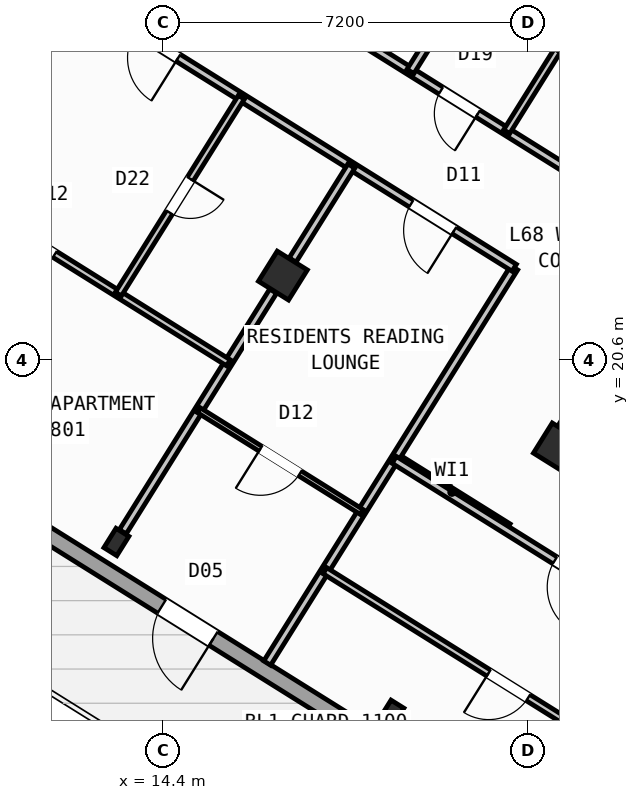
"""IFC4 building model, lengths in metres.
Left out: names, types, materials, properties, quantities, classifications, styles, units other than length and angle.
Written with IfcOpenShell. Run it as: python <this file> out.ifc"""

import sys

from ifc_helpers import new_model, si_unit, direction, frame, frame_2d, origin, origin_2d, place, context, subcontext, project, spatial, rectangle, hollow_rectangle, i_section, extrude, source, transform, mapped, element, fill, save


model = new_model("IFC4")
c1 = context("Model", 3, precision=1e-05, world=origin(), true_north=direction((0.0, 1.0)))
c2 = subcontext(c1, "Body", "Model", "MODEL_VIEW")
j1 = project(units=[si_unit("LENGTHUNIT", "METRE"), si_unit("PLANEANGLEUNIT", "RADIAN")], contexts=[c1])
p1 = place(None, origin())
s1 = spatial("IfcSite", under=j1, at=p1, CompositionType="ELEMENT")
p2 = place(p1, origin())
s2 = spatial("IfcBuilding", under=s1, at=p2, CompositionType="ELEMENT")
p3 = place(p2, frame((0.0, 0.0, 270.0)))
s3 = spatial("IfcBuildingStorey", under=s2, at=p3, CompositionType="ELEMENT", Elevation=270.0)
p4 = place(p3, frame((33.324, 12.503, 0.0), z_axis=(0.0, 0.0, 1.0), x_axis=(-0.848043529849, 0.529926571782, 0.0)))
e1 = element("IfcWall", 1, at=p4, inside=s3, PredefinedType="SHEAR", context=c2, shape_type="SweptSolid", body=[
    extrude(rectangle(XDim=13.04, YDim=0.45, at=frame_2d((6.52, 0.0))), origin(), (0.0, 0.0, 1.0), 3.35),
])
m1 = source(origin(), c2, "Body", "SweptSolid", [
    extrude(hollow_rectangle(XDim=0.7, YDim=0.7, WallThickness=0.028, at=origin_2d()), origin(), (0.0, 0.0, 1.0), 3.6),
])
p5 = place(p3, frame((22.191, 18.87, 0.0), z_axis=(0.0, 0.0, 1.0), x_axis=(-0.848048096156, 0.529919264233, 0.0)))
e2 = element("IfcColumn", 2, at=p5, inside=s3, PredefinedType="COLUMN", context=c2, shape_type="MappedRepresentation", body=[
    mapped(m1, transform((0.0, 0.0, 0.0), scale=1.0)),
])
m2 = source(origin(), c2, "Body", "SweptSolid", [
    extrude(i_section(OverallWidth=0.3, OverallDepth=0.45, WebThickness=0.014, FlangeThickness=0.026, at=origin_2d()), origin(), (0.0, 0.0, 1.0), 3.6),
])
p6 = place(p3, frame((18.906, 13.612, 0.0), z_axis=(0.0, 0.0, 1.0), x_axis=(-0.848048096156, 0.529919264233, 0.0)))
e3 = element("IfcColumn", 3, at=p6, inside=s3, PredefinedType="COLUMN", context=c2, shape_type="MappedRepresentation", body=[
    mapped(m2, transform((0.0, 0.0, 0.0), scale=1.0)),
])
p7 = place(p3, frame((16.764, 22.261, 0.0), z_axis=(0.0, 0.0, 1.0), x_axis=(-0.848048096156, 0.529919264233, 0.0)))
e4 = element("IfcColumn", 4, at=p7, inside=s3, PredefinedType="COLUMN", context=c2, shape_type="MappedRepresentation", body=[
    mapped(m1, transform((0.0, 0.0, 0.0), scale=1.0)),
])
p8 = place(p3, frame((13.478, 17.003, 0.0), z_axis=(0.0, 0.0, 1.0), x_axis=(-0.848048096156, 0.529919264233, 0.0)))
e5 = element("IfcColumn", 5, at=p8, inside=s3, PredefinedType="COLUMN", context=c2, shape_type="MappedRepresentation", body=[
    mapped(m2, transform((0.0, 0.0, 0.0), scale=1.0)),
])
p9 = place(p3, frame((29.268, 6.429, 0.0), z_axis=(0.0, 0.0, 1.0), x_axis=(-0.848049971435, 0.529916263149, 0.0)))
e6 = element("IfcWall", 6, at=p9, inside=s3, PredefinedType="STANDARD", context=c2, shape_type="SweptSolid", body=[
    extrude(rectangle(XDim=31.588, YDim=0.32, at=frame_2d((15.794, 0.0))), origin(), (0.0, 0.0, 1.0), 3.35),
])
p10 = place(p9, frame((16.362, 0.0, 0.0)))
e7 = element("IfcOpeningElement", 7, at=p10, cuts=e6, PredefinedType="OPENING", context=c2, shape_type="SweptSolid", body=[
    extrude(rectangle(XDim=1.2, YDim=2.15, at=frame_2d((0.6, 1.075))), frame((0.0, 0.17, 0.0), z_axis=(0.0, -1.0, 0.0), x_axis=(1.0, 0.0, 0.0)), (0.0, 0.0, 1.0), 0.34),
])
p11 = place(p9, frame((3.859, 0.0, 0.9)))
e8 = element("IfcOpeningElement", 8, at=p11, cuts=e6, PredefinedType="OPENING", context=c2, shape_type="SweptSolid", body=[
    extrude(rectangle(XDim=1.65, YDim=1.45, at=frame_2d((0.825, 0.725))), frame((0.0, 0.17, 0.0), z_axis=(0.0, -1.0, 0.0), x_axis=(1.0, 0.0, 0.0)), (0.0, 0.0, 1.0), 0.34),
])
p12 = place(p9, frame((10.519, 0.0, 0.9)))
e9 = element("IfcOpeningElement", 9, at=p12, cuts=e6, PredefinedType="OPENING", context=c2, shape_type="SweptSolid", body=[
    extrude(rectangle(XDim=1.65, YDim=1.45, at=frame_2d((0.825, 0.725))), frame((0.0, 0.17, 0.0), z_axis=(0.0, -1.0, 0.0), x_axis=(1.0, 0.0, 0.0)), (0.0, 0.0, 1.0), 0.34),
])
p13 = place(p9, frame((21.219, 0.0, 0.95)))
e10 = element("IfcOpeningElement", 10, at=p13, cuts=e6, PredefinedType="OPENING", context=c2, shape_type="SweptSolid", body=[
    extrude(rectangle(XDim=1.95, YDim=1.35, at=frame_2d((0.975, 0.675))), frame((0.0, 0.17, 0.0), z_axis=(0.0, -1.0, 0.0), x_axis=(1.0, 0.0, 0.0)), (0.0, 0.0, 1.0), 0.34),
])
p14 = place(p9, frame((26.406, 0.0, 1.0)))
e11 = element("IfcOpeningElement", 11, at=p14, cuts=e6, PredefinedType="OPENING", context=c2, shape_type="SweptSolid", body=[
    extrude(rectangle(XDim=0.9, YDim=1.25, at=frame_2d((0.45, 0.625))), frame((0.0, 0.17, 0.0), z_axis=(0.0, -1.0, 0.0), x_axis=(1.0, 0.0, 0.0)), (0.0, 0.0, 1.0), 0.34),
])
p15 = place(p9, frame((29.143, 0.0, 0.9)))
e12 = element("IfcOpeningElement", 12, at=p15, cuts=e6, PredefinedType="OPENING", context=c2, shape_type="SweptSolid", body=[
    extrude(rectangle(XDim=1.65, YDim=1.45, at=frame_2d((0.825, 0.725))), frame((0.0, 0.17, 0.0), z_axis=(0.0, -1.0, 0.0), x_axis=(1.0, 0.0, 0.0)), (0.0, 0.0, 1.0), 0.34),
])
p16 = place(p3, frame((2.415, 23.452, 0.0), z_axis=(0.0, 0.0, 1.0), x_axis=(0.52991049553, 0.848053575387, 0.0)))
e13 = element("IfcWall", 13, at=p16, inside=s3, PredefinedType="STANDARD", context=c2, shape_type="SweptSolid", body=[
    extrude(rectangle(XDim=21.587, YDim=0.32, at=frame_2d((10.794, 0.0))), origin(), (0.0, 0.0, 1.0), 2.875),
])
p17 = place(p16, frame((2.606, 0.0, 0.9)))
e14 = element("IfcOpeningElement", 14, at=p17, cuts=e13, PredefinedType="OPENING", context=c2, shape_type="SweptSolid", body=[
    extrude(rectangle(XDim=1.65, YDim=1.45, at=frame_2d((0.825, 0.725))), frame((0.0, 0.17, 0.0), z_axis=(0.0, -1.0, 0.0), x_axis=(1.0, 0.0, 0.0)), (0.0, 0.0, 1.0), 0.34),
])
p18 = place(p16, frame((7.504, 0.0, 1.0)))
e15 = element("IfcOpeningElement", 15, at=p18, cuts=e13, PredefinedType="OPENING", context=c2, shape_type="SweptSolid", body=[
    extrude(rectangle(XDim=0.9, YDim=1.25, at=frame_2d((0.45, 0.625))), frame((0.0, 0.17, 0.0), z_axis=(0.0, -1.0, 0.0), x_axis=(1.0, 0.0, 0.0)), (0.0, 0.0, 1.0), 0.34),
])
p19 = place(p16, frame((12.084, 0.0, 1.0)))
e16 = element("IfcOpeningElement", 16, at=p19, cuts=e13, PredefinedType="OPENING", context=c2, shape_type="SweptSolid", body=[
    extrude(rectangle(XDim=0.9, YDim=1.25, at=frame_2d((0.45, 0.625))), frame((0.0, 0.17, 0.0), z_axis=(0.0, -1.0, 0.0), x_axis=(1.0, 0.0, 0.0)), (0.0, 0.0, 1.0), 0.34),
])
p20 = place(p16, frame((15.619, 0.0, 1.0)))
e17 = element("IfcOpeningElement", 17, at=p20, cuts=e13, PredefinedType="OPENING", context=c2, shape_type="SweptSolid", body=[
    extrude(rectangle(XDim=0.9, YDim=1.25, at=frame_2d((0.45, 0.625))), frame((0.0, 0.17, 0.0), z_axis=(0.0, -1.0, 0.0), x_axis=(1.0, 0.0, 0.0)), (0.0, 0.0, 1.0), 0.34),
])
p21 = place(p16, frame((18.569, 0.0, 1.0)))
e18 = element("IfcOpeningElement", 18, at=p21, cuts=e13, PredefinedType="OPENING", context=c2, shape_type="SweptSolid", body=[
    extrude(rectangle(XDim=0.9, YDim=1.25, at=frame_2d((0.45, 0.625))), frame((0.0, 0.17, 0.0), z_axis=(0.0, -1.0, 0.0), x_axis=(1.0, 0.0, 0.0)), (0.0, 0.0, 1.0), 0.34),
])
p22 = place(p3, frame((14.138, 41.825, 0.0), z_axis=(0.0, 0.0, 1.0), x_axis=(0.848046498049, -0.529921821731, 0.0)))
e19 = element("IfcWall", 19, at=p22, inside=s3, PredefinedType="STANDARD", context=c2, shape_type="SweptSolid", body=[
    extrude(rectangle(XDim=31.588, YDim=0.32, at=frame_2d((15.794, 0.0))), origin(), (0.0, 0.0, 1.0), 3.35),
])
p23 = place(p22, frame((3.46, 0.0, 0.0)))
e20 = element("IfcOpeningElement", 20, at=p23, cuts=e19, PredefinedType="OPENING", context=c2, shape_type="SweptSolid", body=[
    extrude(rectangle(XDim=1.05, YDim=2.15, at=frame_2d((0.525, 1.075))), frame((0.0, 0.17, 0.0), z_axis=(0.0, -1.0, 0.0), x_axis=(1.0, 0.0, 0.0)), (0.0, 0.0, 1.0), 0.34),
])
p24 = place(p22, frame((0.831, 0.0, 1.0)))
e21 = element("IfcOpeningElement", 21, at=p24, cuts=e19, PredefinedType="OPENING", context=c2, shape_type="SweptSolid", body=[
    extrude(rectangle(XDim=0.9, YDim=1.25, at=frame_2d((0.45, 0.625))), frame((0.0, 0.17, 0.0), z_axis=(0.0, -1.0, 0.0), x_axis=(1.0, 0.0, 0.0)), (0.0, 0.0, 1.0), 0.34),
])
p25 = place(p22, frame((8.719, 0.0, 0.9)))
e22 = element("IfcOpeningElement", 22, at=p25, cuts=e19, PredefinedType="OPENING", context=c2, shape_type="SweptSolid", body=[
    extrude(rectangle(XDim=1.35, YDim=1.45, at=frame_2d((0.675, 0.725))), frame((0.0, 0.17, 0.0), z_axis=(0.0, -1.0, 0.0), x_axis=(1.0, 0.0, 0.0)), (0.0, 0.0, 1.0), 0.34),
])
p26 = place(p22, frame((13.599, 0.0, 0.95)))
e23 = element("IfcOpeningElement", 23, at=p26, cuts=e19, PredefinedType="OPENING", context=c2, shape_type="SweptSolid", body=[
    extrude(rectangle(XDim=1.95, YDim=1.35, at=frame_2d((0.975, 0.675))), frame((0.0, 0.17, 0.0), z_axis=(0.0, -1.0, 0.0), x_axis=(1.0, 0.0, 0.0)), (0.0, 0.0, 1.0), 0.34),
])
p27 = place(p22, frame((17.154, 0.0, 1.0)))
e24 = element("IfcOpeningElement", 24, at=p27, cuts=e19, PredefinedType="OPENING", context=c2, shape_type="SweptSolid", body=[
    extrude(rectangle(XDim=0.9, YDim=1.25, at=frame_2d((0.45, 0.625))), frame((0.0, 0.17, 0.0), z_axis=(0.0, -1.0, 0.0), x_axis=(1.0, 0.0, 0.0)), (0.0, 0.0, 1.0), 0.34),
])
p28 = place(p22, frame((21.719, 0.0, 0.9)))
e25 = element("IfcOpeningElement", 25, at=p28, cuts=e19, PredefinedType="OPENING", context=c2, shape_type="SweptSolid", body=[
    extrude(rectangle(XDim=1.65, YDim=1.45, at=frame_2d((0.825, 0.725))), frame((0.0, 0.17, 0.0), z_axis=(0.0, -1.0, 0.0), x_axis=(1.0, 0.0, 0.0)), (0.0, 0.0, 1.0), 0.34),
])
p29 = place(p22, frame((27.419, 0.0, 0.9)))
e26 = element("IfcOpeningElement", 26, at=p29, cuts=e19, PredefinedType="OPENING", context=c2, shape_type="SweptSolid", body=[
    extrude(rectangle(XDim=1.65, YDim=1.45, at=frame_2d((0.825, 0.725))), frame((0.0, 0.17, 0.0), z_axis=(0.0, -1.0, 0.0), x_axis=(1.0, 0.0, 0.0)), (0.0, 0.0, 1.0), 0.34),
])
p30 = place(p3, frame((21.206, 17.292, 0.0), z_axis=(0.0, 0.0, 1.0), x_axis=(-0.848050851465, 0.529914854792, 0.0)))
e27 = element("IfcWall", 27, at=p30, inside=s3, PredefinedType="PARTITIONING", context=c2, shape_type="SweptSolid", body=[
    extrude(rectangle(XDim=2.61, YDim=0.16, at=frame_2d((1.305, 0.0))), origin(), (0.0, 0.0, 1.0), 3.34),
])
p31 = place(p3, frame((21.329, 22.416, 0.0), z_axis=(0.0, 0.0, 1.0), x_axis=(-0.529920220799, -0.848047498427, 0.0)))
e28 = element("IfcWall", 28, at=p31, inside=s3, PredefinedType="PARTITIONING", context=c2, shape_type="SweptSolid", body=[
    extrude(rectangle(XDim=9.2, YDim=0.16, at=frame_2d((4.6, 0.0))), origin(), (0.0, 0.0, 1.0), 3.34),
])
p32 = place(p3, frame((22.495, 24.281, 0.0), z_axis=(0.0, 0.0, 1.0), x_axis=(-0.848052408131, 0.529912363569, 0.0)))
e29 = element("IfcWall", 29, at=p32, inside=s3, PredefinedType="PARTITIONING", context=c2, shape_type="SweptSolid", body=[
    extrude(rectangle(XDim=16.73, YDim=0.16, at=frame_2d((8.365, 0.0))), origin(), (0.0, 0.0, 1.0), 3.34),
])
p33 = place(p32, frame((2.22, 0.0, 0.0)))
e30 = element("IfcOpeningElement", 30, at=p33, cuts=e29, PredefinedType="OPENING", context=c2, shape_type="SweptSolid", body=[
    extrude(rectangle(XDim=0.86, YDim=2.05, at=frame_2d((0.43, 1.025))), frame((0.0, 0.09, 0.0), z_axis=(0.0, -1.0, 0.0), x_axis=(1.0, 0.0, 0.0)), (0.0, 0.0, 1.0), 0.18),
])
p34 = place(p32, frame((6.49, 0.0, 0.0)))
e31 = element("IfcOpeningElement", 31, at=p34, cuts=e29, PredefinedType="OPENING", context=c2, shape_type="SweptSolid", body=[
    extrude(rectangle(XDim=1.0, YDim=2.1, at=frame_2d((0.5, 1.05))), frame((0.0, 0.09, 0.0), z_axis=(0.0, -1.0, 0.0), x_axis=(1.0, 0.0, 0.0)), (0.0, 0.0, 1.0), 0.18),
])
p35 = place(p32, frame((14.76, 0.0, 0.0)))
e32 = element("IfcOpeningElement", 32, at=p35, cuts=e29, PredefinedType="OPENING", context=c2, shape_type="SweptSolid", body=[
    extrude(rectangle(XDim=1.0, YDim=2.1, at=frame_2d((0.5, 1.05))), frame((0.0, 0.09, 0.0), z_axis=(0.0, -1.0, 0.0), x_axis=(1.0, 0.0, 0.0)), (0.0, 0.0, 1.0), 0.18),
])
p36 = place(p3, frame((21.329, 22.416, 0.0), z_axis=(0.0, 0.0, 1.0), x_axis=(-0.848052408131, 0.529912363569, 0.0)))
e33 = element("IfcWall", 33, at=p36, inside=s3, PredefinedType="PARTITIONING", context=c2, shape_type="SweptSolid", body=[
    extrude(rectangle(XDim=16.73, YDim=0.16, at=frame_2d((8.365, 0.0))), origin(), (0.0, 0.0, 1.0), 3.34),
])
p37 = place(p36, frame((1.395, 0.0, 0.0)))
e34 = element("IfcOpeningElement", 34, at=p37, cuts=e33, PredefinedType="OPENING", context=c2, shape_type="SweptSolid", body=[
    extrude(rectangle(XDim=1.0, YDim=2.1, at=frame_2d((0.5, 1.05))), frame((0.0, 0.09, 0.0), z_axis=(0.0, -1.0, 0.0), x_axis=(1.0, 0.0, 0.0)), (0.0, 0.0, 1.0), 0.18),
])
p38 = place(p36, frame((7.82, 0.0, 0.0)))
e35 = element("IfcOpeningElement", 35, at=p38, cuts=e33, PredefinedType="OPENING", context=c2, shape_type="SweptSolid", body=[
    extrude(rectangle(XDim=1.0, YDim=2.1, at=frame_2d((0.5, 1.05))), frame((0.0, 0.09, 0.0), z_axis=(0.0, -1.0, 0.0), x_axis=(1.0, 0.0, 0.0)), (0.0, 0.0, 1.0), 0.18),
])
p39 = place(p36, frame((11.14, 0.0, 0.0)))
e36 = element("IfcOpeningElement", 36, at=p39, cuts=e33, PredefinedType="OPENING", context=c2, shape_type="SweptSolid", body=[
    extrude(rectangle(XDim=1.0, YDim=2.1, at=frame_2d((0.5, 1.05))), frame((0.0, 0.09, 0.0), z_axis=(0.0, -1.0, 0.0), x_axis=(1.0, 0.0, 0.0)), (0.0, 0.0, 1.0), 0.18),
])
p40 = place(p3, frame((18.115, 24.424, 0.0), z_axis=(0.0, 0.0, 1.0), x_axis=(-0.529998940003, -0.847998304005, 0.0)))
e37 = element("IfcWall", 37, at=p40, inside=s3, PredefinedType="PARTITIONING", context=c2, shape_type="SweptSolid", body=[
    extrude(rectangle(XDim=2.188, YDim=0.16, at=frame_2d((1.094, 0.0))), origin(), (0.0, 0.0, 1.0), 2.875),
])
p41 = place(p3, frame((16.572, 21.954, 0.0), z_axis=(0.0, 0.0, 1.0), x_axis=(-0.529904903214, -0.848057069748, 0.0)))
e38 = element("IfcWall", 38, at=p41, inside=s3, PredefinedType="PARTITIONING", context=c2, shape_type="SweptSolid", body=[
    extrude(rectangle(XDim=5.601, YDim=0.16, at=frame_2d((2.801, 0.0))), origin(), (0.0, 0.0, 1.0), 2.875),
])
p42 = place(p3, frame((18.318, 17.597, 0.0), z_axis=(0.0, 0.0, 1.0), x_axis=(-0.848059820872, 0.529900500304, 0.0)))
e39 = element("IfcWall", 39, at=p42, inside=s3, PredefinedType="PARTITIONING", context=c2, shape_type="SweptSolid", body=[
    extrude(rectangle(XDim=3.79, YDim=0.11, at=frame_2d((1.895, 0.0))), origin(), (0.0, 0.0, 1.0), 3.34),
])
p43 = place(p42, frame((1.435, 0.0, 0.0)))
e40 = element("IfcOpeningElement", 40, at=p43, cuts=e39, PredefinedType="OPENING", context=c2, shape_type="SweptSolid", body=[
    extrude(rectangle(XDim=0.92, YDim=2.08, at=frame_2d((0.46, 1.04))), frame((0.0, 0.065, 0.0), z_axis=(0.0, -1.0, 0.0), x_axis=(1.0, 0.0, 0.0)), (0.0, 0.0, 1.0), 0.13),
])
p44 = place(p3, frame((12.688, 27.815, 0.0), z_axis=(0.0, 0.0, 1.0), x_axis=(-0.52994879608, -0.848029641896, 0.0)))
e41 = element("IfcWall", 41, at=p44, inside=s3, PredefinedType="PARTITIONING", context=c2, shape_type="SweptSolid", body=[
    extrude(rectangle(XDim=2.188, YDim=0.16, at=frame_2d((1.094, 0.0))), origin(), (0.0, 0.0, 1.0), 2.875),
])
p45 = place(p3, frame((15.688, 20.54, 0.0), z_axis=(0.0, 0.0, 1.0), x_axis=(-0.848049732085, 0.529916646191, 0.0)))
e42 = element("IfcWall", 42, at=p45, inside=s3, PredefinedType="PLUMBINGWALL", context=c2, shape_type="SweptSolid", body=[
    extrude(rectangle(XDim=6.4, YDim=0.14, at=frame_2d((3.2, 0.0))), origin(), (0.0, 0.0, 1.0), 3.34),
])
p46 = place(p45, frame((4.04, 0.0, 0.0)))
e43 = element("IfcOpeningElement", 43, at=p46, cuts=e42, PredefinedType="OPENING", context=c2, shape_type="SweptSolid", body=[
    extrude(rectangle(XDim=0.92, YDim=2.08, at=frame_2d((0.46, 1.04))), frame((0.0, 0.08, 0.0), z_axis=(0.0, -1.0, 0.0), x_axis=(1.0, 0.0, 0.0)), (0.0, 0.0, 1.0), 0.16),
])
p47 = place(p3, frame((15.944, 25.781, 0.0), z_axis=(0.0, 0.0, 1.0), x_axis=(-0.529917480809, -0.848049210561, 0.0)))
e44 = element("IfcWall", 44, at=p47, inside=s3, PredefinedType="PLUMBINGWALL", context=c2, shape_type="SweptSolid", body=[
    extrude(rectangle(XDim=4.58, YDim=0.14, at=frame_2d((2.29, 0.0))), origin(), (0.0, 0.0, 1.0), 3.34),
])
p48 = place(p47, frame((1.9, 0.0, 0.0)))
e45 = element("IfcOpeningElement", 45, at=p48, cuts=e44, PredefinedType="OPENING", context=c2, shape_type="SweptSolid", body=[
    extrude(rectangle(XDim=0.78, YDim=2.05, at=frame_2d((0.39, 1.025))), frame((0.0, 0.08, 0.0), z_axis=(0.0, -1.0, 0.0), x_axis=(1.0, 0.0, 0.0)), (0.0, 0.0, 1.0), 0.16),
])
p49 = place(p3, frame((20.44, 28.145, 0.0), z_axis=(0.0, 0.0, 1.0), x_axis=(-0.5299186965, -0.848048450915, 0.0)))
e46 = element("IfcWall", 46, at=p49, inside=s3, PredefinedType="PARTITIONING", context=c2, shape_type="SweptSolid", body=[
    extrude(rectangle(XDim=2.188, YDim=0.16, at=frame_2d((1.094, 0.0))), origin(), (0.0, 0.0, 1.0), 2.875),
])
p50 = place(p3, frame((23.57, 28.927, 0.0), z_axis=(0.0, 0.0, 1.0), x_axis=(-0.529911350634, -0.84805304107, 0.0)))
e47 = element("IfcWall", 47, at=p50, inside=s3, PredefinedType="PLUMBINGWALL", context=c2, shape_type="SweptSolid", body=[
    extrude(rectangle(XDim=4.51, YDim=0.14, at=frame_2d((2.255, 0.0))), origin(), (0.0, 0.0, 1.0), 3.025),
])
p51 = place(p50, frame((1.865, 0.0, 0.0)))
e48 = element("IfcOpeningElement", 48, at=p51, cuts=e47, PredefinedType="OPENING", context=c2, shape_type="SweptSolid", body=[
    extrude(rectangle(XDim=0.78, YDim=2.05, at=frame_2d((0.39, 1.025))), frame((0.0, 0.08, 0.0), z_axis=(0.0, -1.0, 0.0), x_axis=(1.0, 0.0, 0.0)), (0.0, 0.0, 1.0), 0.16),
])
p52 = place(p3, frame((32.164, 10.374, 0.0), z_axis=(0.0, 0.0, 1.0), x_axis=(-0.848044107957, 0.529925646633, 0.0)))
e49 = element("IfcWall", 49, at=p52, inside=s3, PredefinedType="PARTITIONING", context=c2, shape_type="SweptSolid", body=[
    extrude(rectangle(XDim=15.57, YDim=0.16, at=frame_2d((7.785, 0.0))), origin(), (0.0, 0.0, 1.0), 3.34),
])
p53 = place(p52, frame((10.83, 0.0, 0.0)))
e50 = element("IfcOpeningElement", 50, at=p53, cuts=e49, PredefinedType="OPENING", context=c2, shape_type="SweptSolid", body=[
    extrude(rectangle(XDim=1.0, YDim=2.1, at=frame_2d((0.5, 1.05))), frame((0.0, 0.09, 0.0), z_axis=(0.0, -1.0, 0.0), x_axis=(1.0, 0.0, 0.0)), (0.0, 0.0, 1.0), 0.18),
])
p54 = place(p3, frame((29.72, 8.859, 0.0), z_axis=(0.0, 0.0, 1.0), x_axis=(-0.848049134363, 0.529917602752, 0.0)))
e51 = element("IfcWall", 51, at=p54, inside=s3, PredefinedType="PLUMBINGWALL", context=c2, shape_type="SweptSolid", body=[
    extrude(rectangle(XDim=14.3, YDim=0.14, at=frame_2d((7.15, 0.0))), origin(), (0.0, 0.0, 1.0), 3.34),
])
p55 = place(p54, frame((9.57, 0.0, 0.0)))
e52 = element("IfcOpeningElement", 52, at=p55, cuts=e51, PredefinedType="OPENING", context=c2, shape_type="SweptSolid", body=[
    extrude(rectangle(XDim=0.92, YDim=2.08, at=frame_2d((0.46, 1.04))), frame((0.0, 0.08, 0.0), z_axis=(0.0, -1.0, 0.0), x_axis=(1.0, 0.0, 0.0)), (0.0, 0.0, 1.0), 0.16),
])
m3 = source(origin(), c2, "Body", "SweptSolid", [
    extrude(rectangle(XDim=1.2, YDim=2.15, at=frame_2d((0.6, 1.075))), frame((0.0, 0.025, 0.0), z_axis=(0.0, -1.0, 0.0), x_axis=(1.0, 0.0, 0.0)), (0.0, 0.0, 1.0), 0.05),
])
p56 = place(p10, origin())
e53 = element("IfcDoor", 53, at=p56, inside=s3, OperationType="SINGLE_SWING_LEFT", PredefinedType="DOOR", context=c2, shape_type="MappedRepresentation", body=[
    mapped(m3, transform((0.0, 0.0, 0.0), scale=1.0)),
])
fill(e7, e53)
m4 = source(origin(), c2, "Body", "SweptSolid", [
    extrude(rectangle(XDim=1.0, YDim=2.1, at=frame_2d((0.5, 1.05))), frame((0.0, 0.025, 0.0), z_axis=(0.0, -1.0, 0.0), x_axis=(1.0, 0.0, 0.0)), (0.0, 0.0, 1.0), 0.05),
])
p57 = place(p37, origin())
e54 = element("IfcDoor", 54, at=p57, inside=s3, OperationType="SINGLE_SWING_LEFT", PredefinedType="DOOR", context=c2, shape_type="MappedRepresentation", body=[
    mapped(m4, transform((0.0, 0.0, 0.0), scale=1.0)),
])
fill(e34, e54)
m5 = source(origin(), c2, "Body", "SweptSolid", [
    extrude(rectangle(XDim=0.92, YDim=2.08, at=frame_2d((0.46, 1.04))), frame((0.0, 0.025, 0.0), z_axis=(0.0, -1.0, 0.0), x_axis=(1.0, 0.0, 0.0)), (0.0, 0.0, 1.0), 0.05),
])
p58 = place(p43, origin())
e55 = element("IfcDoor", 55, at=p58, inside=s3, OperationType="SINGLE_SWING_RIGHT", PredefinedType="DOOR", context=c2, shape_type="MappedRepresentation", body=[
    mapped(m5, transform((0.0, 0.0, 0.0), scale=1.0)),
])
fill(e40, e55)
p59 = place(p38, origin())
e56 = element("IfcDoor", 56, at=p59, inside=s3, OperationType="SINGLE_SWING_LEFT", PredefinedType="DOOR", context=c2, shape_type="MappedRepresentation", body=[
    mapped(m4, transform((0.0, 0.0, 0.0), scale=1.0)),
])
fill(e35, e56)
p60 = place(p46, origin())
e57 = element("IfcDoor", 57, at=p60, inside=s3, OperationType="SINGLE_SWING_RIGHT", PredefinedType="DOOR", context=c2, shape_type="MappedRepresentation", body=[
    mapped(m5, transform((0.0, 0.0, 0.0), scale=1.0)),
])
fill(e43, e57)
m6 = source(origin(), c2, "Body", "SweptSolid", [
    extrude(rectangle(XDim=0.78, YDim=2.05, at=frame_2d((0.39, 1.025))), frame((0.0, 0.025, 0.0), z_axis=(0.0, -1.0, 0.0), x_axis=(1.0, 0.0, 0.0)), (0.0, 0.0, 1.0), 0.05),
])
p61 = place(p48, origin())
e58 = element("IfcDoor", 58, at=p61, inside=s3, OperationType="SINGLE_SWING_LEFT", PredefinedType="DOOR", context=c2, shape_type="MappedRepresentation", body=[
    mapped(m6, transform((0.0, 0.0, 0.0), scale=1.0)),
])
fill(e45, e58)
m7 = source(origin(), c2, "Body", "SweptSolid", [
    extrude(rectangle(XDim=0.86, YDim=2.05, at=frame_2d((0.43, 1.025))), frame((0.0, 0.025, 0.0), z_axis=(0.0, -1.0, 0.0), x_axis=(1.0, 0.0, 0.0)), (0.0, 0.0, 1.0), 0.05),
])
p62 = place(p33, origin())
e59 = element("IfcDoor", 59, at=p62, inside=s3, OperationType="SINGLE_SWING_LEFT", PredefinedType="DOOR", context=c2, shape_type="MappedRepresentation", body=[
    mapped(m7, transform((0.0, 0.0, 0.0), scale=1.0)),
])
fill(e30, e59)
p63 = place(p51, origin())
e60 = element("IfcDoor", 60, at=p63, inside=s3, OperationType="SINGLE_SWING_LEFT", PredefinedType="DOOR", context=c2, shape_type="MappedRepresentation", body=[
    mapped(m6, transform((0.0, 0.0, 0.0), scale=1.0)),
])
fill(e48, e60)
p64 = place(p53, origin())
e61 = element("IfcDoor", 61, at=p64, inside=s3, OperationType="SINGLE_SWING_LEFT", PredefinedType="DOOR", context=c2, shape_type="MappedRepresentation", body=[
    mapped(m4, transform((0.0, 0.0, 0.0), scale=1.0)),
])
fill(e50, e61)
p65 = place(p55, origin())
e62 = element("IfcDoor", 62, at=p65, inside=s3, OperationType="SINGLE_SWING_RIGHT", PredefinedType="DOOR", context=c2, shape_type="MappedRepresentation", body=[
    mapped(m5, transform((0.0, 0.0, 0.0), scale=1.0)),
])
fill(e52, e62)
save(model, sys.argv[1])
